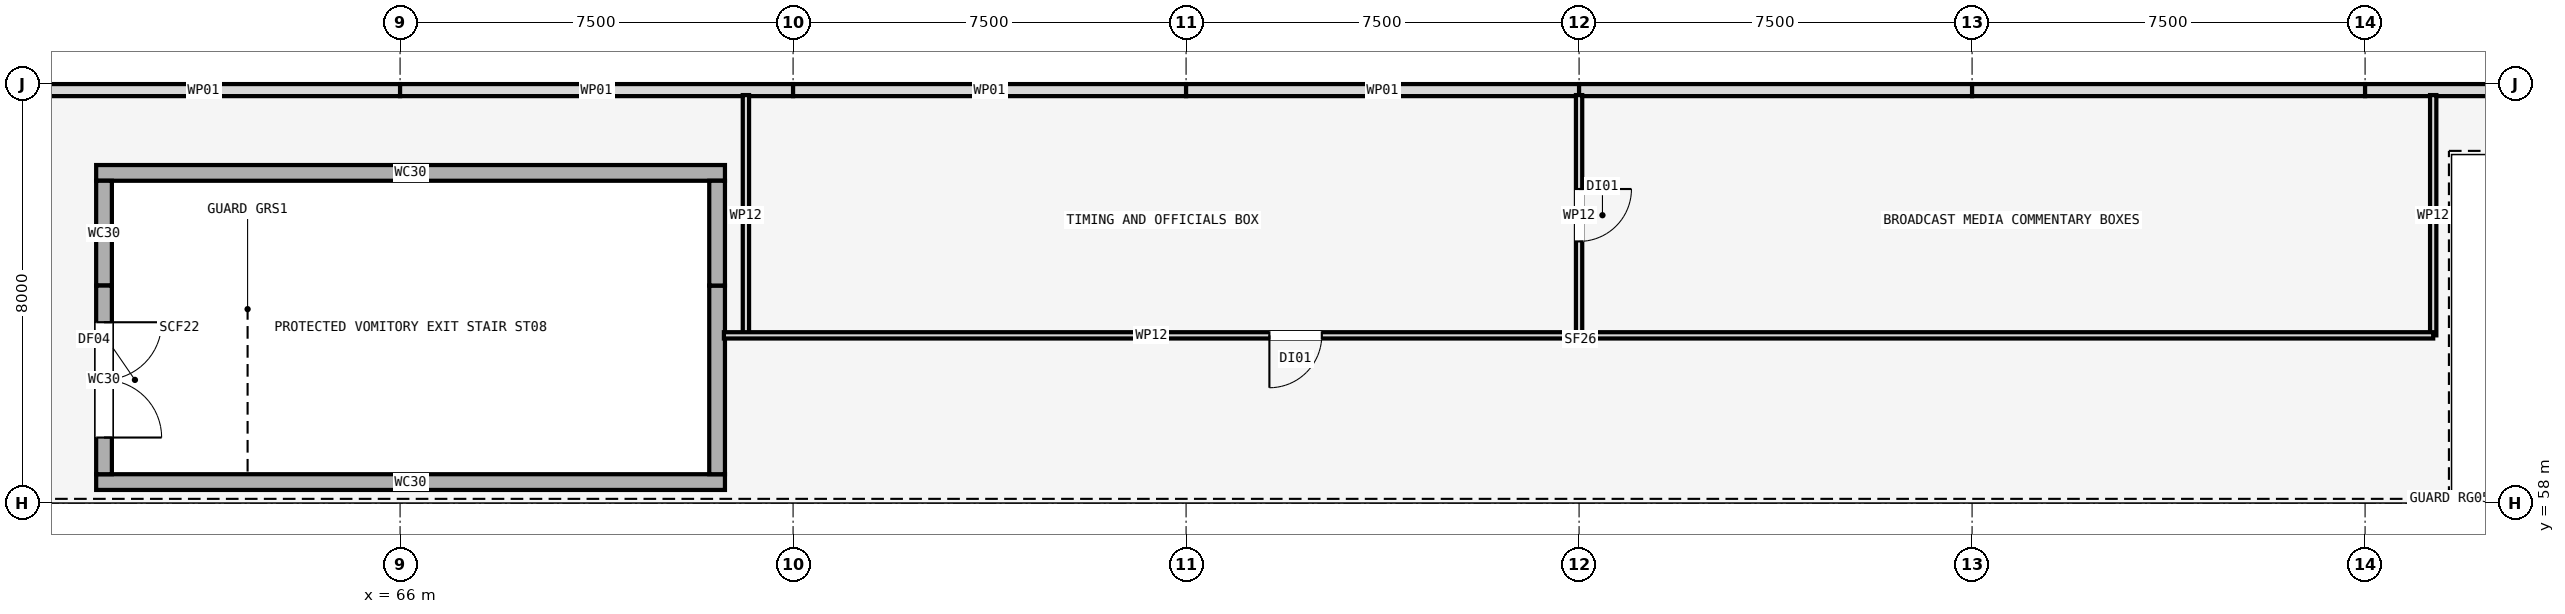
"""IFC4 building model, lengths in metres.
Left out: names, types, materials, properties, quantities, classifications, styles, units other than length and angle.
Written with IfcOpenShell. Run it as: python <this file> out.ifc"""

import sys

from ifc_helpers import new_model, si_unit, direction, frame, frame_2d, origin, place, context, subcontext, project, spatial, rectangle, extrude, element, fill, save


model = new_model("IFC4")
c1 = context("Model", 3, precision=1e-05, world=origin(), true_north=direction((0.0, 1.0)))
c2 = subcontext(c1, "Body", "Model", "MODEL_VIEW")
j1 = project(units=[si_unit("LENGTHUNIT", "METRE"), si_unit("PLANEANGLEUNIT", "RADIAN")], contexts=[c1])
p1 = place(None, origin())
s1 = spatial("IfcSite", under=j1, at=p1, CompositionType="ELEMENT")
p2 = place(p1, origin())
s2 = spatial("IfcBuilding", under=s1, at=p2, CompositionType="ELEMENT")
p3 = place(p2, frame((0.0, 0.0, 9.3)))
s3 = spatial("IfcBuildingStorey", under=s2, at=p3, CompositionType="ELEMENT", Elevation=9.3)
for number, where, z_axis, x_axis in (
    (1, (66.0, 65.88, 0.0), (0.0, 0.0, 1.0), (-1.0, 0.0, 0.0)),
    (2, (73.5, 65.88, 0.0), (0.0, 0.0, 1.0), (-1.0, 0.0, 0.0)),
    (3, (81.0, 65.88, 0.0), (0.0, 0.0, 1.0), (-1.0, 0.0, 0.0)),
    (4, (88.5, 65.88, 0.0), (0.0, 0.0, 1.0), (-1.0, 0.0, 0.0)),
    (5, (96.0, 65.88, 0.0), (0.0, 0.0, 1.0), (-1.0, 0.0, 0.0)),
    (6, (103.5, 65.88, 0.0), (0.0, 0.0, 1.0), (-1.0, 0.0, 0.0)),
    (7, (111.0, 65.88, 0.0), (0.0, 0.0, 1.0), (-1.0, 0.0, 0.0)),
):
    element("IfcWall", number, at=place(p3, frame(where, z_axis=z_axis, x_axis=x_axis)), inside=s3, PredefinedType="PARAPET", context=c2, shape_type="SweptSolid", body=[
        extrude(rectangle(XDim=7.5, YDim=0.23, at=frame_2d((3.75, 0.0))), origin(), (0.0, 0.0, 1.0), 1.8),
    ])
p4 = place(p3, frame((60.2, 58.4, 0.0), z_axis=(0.0, 0.0, 1.0), x_axis=(1.0, 0.0, 0.0)))
e8 = element("IfcWall", 8, at=p4, inside=s3, PredefinedType="SHEAR", context=c2, shape_type="SweptSolid", body=[
    extrude(rectangle(XDim=12.0, YDim=0.3, at=frame_2d((6.0, 0.0))), origin(), (0.0, 0.0, 1.0), 2.5),
])
p5 = place(p3, frame((72.2, 64.3, 0.0), z_axis=(0.0, 0.0, 1.0), x_axis=(-1.0, 0.0, 0.0)))
e9 = element("IfcWall", 9, at=p5, inside=s3, PredefinedType="SHEAR", context=c2, shape_type="SweptSolid", body=[
    extrude(rectangle(XDim=12.0, YDim=0.3, at=frame_2d((6.0, 0.0))), origin(), (0.0, 0.0, 1.0), 1.35),
])
p6 = place(p3, frame((60.35, 64.15, 0.0), z_axis=(0.0, 0.0, 1.0), x_axis=(0.0, -1.0, 0.0)))
e10 = element("IfcWall", 10, at=p6, inside=s3, PredefinedType="SHEAR", context=c2, shape_type="SweptSolid", body=[
    extrude(rectangle(XDim=2.0, YDim=0.3, at=frame_2d((1.0, 0.0))), origin(), (0.0, 0.0, 1.0), 1.35),
])
p7 = place(p3, frame((60.35, 62.15, 0.0), z_axis=(0.0, 0.0, 1.0), x_axis=(0.0, -1.0, 0.0)))
e11 = element("IfcWall", 11, at=p7, inside=s3, PredefinedType="SHEAR", context=c2, shape_type="SweptSolid", body=[
    extrude(rectangle(XDim=3.6, YDim=0.3, at=frame_2d((1.8, 0.0))), origin(), (0.0, 0.0, 1.0), 2.5),
])
p8 = place(p7, frame((0.7, 0.0, 0.0)))
e12 = element("IfcOpeningElement", 12, at=p8, cuts=e11, PredefinedType="OPENING", context=c2, shape_type="SweptSolid", body=[
    extrude(rectangle(XDim=2.2, YDim=2.25, at=frame_2d((1.1, 1.125))), frame((0.0, 0.16, 0.0), z_axis=(0.0, -1.0, 0.0), x_axis=(1.0, 0.0, 0.0)), (0.0, 0.0, 1.0), 0.32),
])
p9 = place(p3, frame((72.05, 58.55, 0.0), z_axis=(0.0, 0.0, 1.0), x_axis=(0.0, 1.0, 0.0)))
e13 = element("IfcWall", 13, at=p9, inside=s3, PredefinedType="SHEAR", context=c2, shape_type="SweptSolid", body=[
    extrude(rectangle(XDim=3.6, YDim=0.3, at=frame_2d((1.8, 0.0))), origin(), (0.0, 0.0, 1.0), 2.5),
])
p10 = place(p3, frame((72.05, 62.15, 0.0), z_axis=(0.0, 0.0, 1.0), x_axis=(0.0, 1.0, 0.0)))
e14 = element("IfcWall", 14, at=p10, inside=s3, PredefinedType="SHEAR", context=c2, shape_type="SweptSolid", body=[
    extrude(rectangle(XDim=2.0, YDim=0.3, at=frame_2d((1.0, 0.0))), origin(), (0.0, 0.0, 1.0), 1.35),
])
p11 = place(p3, frame((72.6, 61.2, 0.0), z_axis=(0.0, 0.0, 1.0), x_axis=(0.0, 1.0, 0.0)))
e15 = element("IfcWall", 15, at=p11, inside=s3, PredefinedType="PARTITIONING", context=c2, shape_type="SweptSolid", body=[
    extrude(rectangle(XDim=4.585, YDim=0.12, at=frame_2d((2.292, 0.0))), origin(), (0.0, 0.0, 1.0), 3.12),
])
p12 = place(p3, frame((88.5, 61.2, 0.0), z_axis=(0.0, 0.0, 1.0), x_axis=(-1.0, 0.0, 0.0)))
e16 = element("IfcWall", 16, at=p12, inside=s3, PredefinedType="PARTITIONING", context=c2, shape_type="SweptSolid", body=[
    extrude(rectangle(XDim=16.32, YDim=0.12, at=frame_2d((8.16, 0.0))), origin(), (0.0, 0.0, 1.0), 3.12),
])
p13 = place(p12, frame((4.91, 0.0, 0.0)))
e17 = element("IfcOpeningElement", 17, at=p13, cuts=e16, PredefinedType="OPENING", context=c2, shape_type="SweptSolid", body=[
    extrude(rectangle(XDim=1.0, YDim=2.1, at=frame_2d((0.5, 1.05))), frame((0.0, 0.07, 0.0), z_axis=(0.0, -1.0, 0.0), x_axis=(1.0, 0.0, 0.0)), (0.0, 0.0, 1.0), 0.14),
])
p14 = place(p3, frame((88.5, 65.785, 0.0), z_axis=(0.0, 0.0, 1.0), x_axis=(0.0, -1.0, 0.0)))
e18 = element("IfcWall", 18, at=p14, inside=s3, PredefinedType="PARTITIONING", context=c2, shape_type="SweptSolid", body=[
    extrude(rectangle(XDim=4.585, YDim=0.12, at=frame_2d((2.292, 0.0))), origin(), (0.0, 0.0, 1.0), 3.12),
])
p15 = place(p14, frame((1.792, 0.0, 0.0)))
e19 = element("IfcOpeningElement", 19, at=p15, cuts=e18, PredefinedType="OPENING", context=c2, shape_type="SweptSolid", body=[
    extrude(rectangle(XDim=1.0, YDim=2.1, at=frame_2d((0.5, 1.05))), frame((0.0, 0.07, 0.0), z_axis=(0.0, -1.0, 0.0), x_axis=(1.0, 0.0, 0.0)), (0.0, 0.0, 1.0), 0.14),
])
p16 = place(p3, frame((104.8, 65.785, 0.0), z_axis=(0.0, 0.0, 1.0), x_axis=(0.0, -1.0, 0.0)))
e20 = element("IfcWall", 20, at=p16, inside=s3, PredefinedType="PARTITIONING", context=c2, shape_type="SweptSolid", body=[
    extrude(rectangle(XDim=4.585, YDim=0.12, at=frame_2d((2.292, 0.0))), origin(), (0.0, 0.0, 1.0), 3.12),
])
p17 = place(p3, frame((104.8, 61.2, 0.0), z_axis=(0.0, 0.0, 1.0), x_axis=(-1.0, 0.0, 0.0)))
e21 = element("IfcWall", 21, at=p17, inside=s3, PredefinedType="PARTITIONING", context=c2, shape_type="SweptSolid", body=[
    extrude(rectangle(XDim=16.26, YDim=0.12, at=frame_2d((8.13, 0.0))), origin(), (0.0, 0.0, 1.0), 3.12),
])
p18 = place(p8, origin())
e22 = element("IfcDoor", 22, at=p18, inside=s3, OperationType="DOUBLE_DOOR_SINGLE_SWING", PredefinedType="DOOR", context=c2, shape_type="SweptSolid", body=[
    extrude(rectangle(XDim=2.2, YDim=2.25, at=frame_2d((1.1, 1.125))), frame((0.0, 0.025, 0.0), z_axis=(0.0, -1.0, 0.0), x_axis=(1.0, 0.0, 0.0)), (0.0, 0.0, 1.0), 0.05),
])
fill(e12, e22)
p19 = place(p13, origin())
e23 = element("IfcDoor", 23, at=p19, inside=s3, OperationType="SINGLE_SWING_RIGHT", PredefinedType="DOOR", context=c2, shape_type="SweptSolid", body=[
    extrude(rectangle(XDim=1.0, YDim=2.1, at=frame_2d((0.5, 1.05))), frame((0.0, 0.025, 0.0), z_axis=(0.0, -1.0, 0.0), x_axis=(1.0, 0.0, 0.0)), (0.0, 0.0, 1.0), 0.05),
])
fill(e17, e23)
p20 = place(p15, origin())
e24 = element("IfcDoor", 24, at=p20, inside=s3, OperationType="SINGLE_SWING_LEFT", PredefinedType="DOOR", context=c2, shape_type="SweptSolid", body=[
    extrude(rectangle(XDim=1.0, YDim=2.1, at=frame_2d((0.5, 1.05))), frame((0.0, 0.025, 0.0), z_axis=(0.0, -1.0, 0.0), x_axis=(1.0, 0.0, 0.0)), (0.0, 0.0, 1.0), 0.05),
])
fill(e19, e24)
save(model, sys.argv[1])
